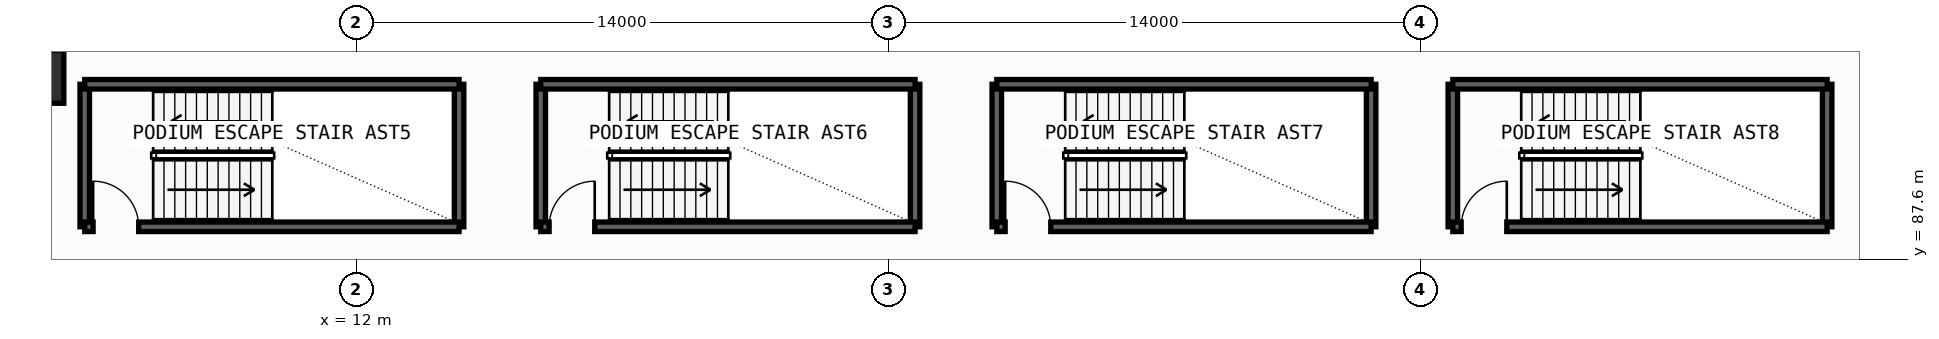
"""IFC4 building model, lengths in metres.
Left out: names, types, materials, properties, quantities, classifications, styles, units other than length and angle.
Written with IfcOpenShell. Run it as: python <this file> out.ifc"""

import sys

from ifc_helpers import new_model, si_unit, direction, frame, frame_2d, origin, origin_2d, place, context, subcontext, project, spatial, rectangle, extrude, element, fill, save


model = new_model("IFC4")
c1 = context("Model", 3, precision=1e-05, world=origin(), true_north=direction((0.0, 1.0)))
c2 = subcontext(c1, "Body", "Model", "MODEL_VIEW")
j1 = project(units=[si_unit("LENGTHUNIT", "METRE"), si_unit("PLANEANGLEUNIT", "RADIAN")], contexts=[c1])
p1 = place(None, origin())
s1 = spatial("IfcSite", under=j1, at=p1, CompositionType="ELEMENT")
p2 = place(p1, origin())
s2 = spatial("IfcBuilding", under=s1, at=p2, CompositionType="ELEMENT")
p3 = place(p2, frame((0.0, 0.0, 13.2)))
s3 = spatial("IfcBuildingStorey", under=s2, at=p3, CompositionType="ELEMENT", Elevation=13.2)
p4 = place(p3, frame((3.6, 92.4, 0.0), z_axis=(0.0, 0.0, 1.0), x_axis=(1.0, 0.0, 0.0)))
e1 = element("IfcColumn", 1, at=p4, inside=s3, PredefinedType="COLUMN", context=c2, shape_type="SweptSolid", body=[
    extrude(rectangle(XDim=1.4, YDim=1.4, at=origin_2d()), origin(), (0.0, 0.0, 1.0), 4.2),
])
for number, where, z_axis, x_axis in (
    (2, (4.85, 88.45, -0.32), (0.0, 0.0, 1.0), (0.0, 1.0, 0.0)),
    (3, (14.7, 88.45, -0.32), (0.0, 0.0, 1.0), (0.0, 1.0, 0.0)),
):
    element("IfcWall", number, at=place(p3, frame(where, z_axis=z_axis, x_axis=x_axis)), inside=s3, PredefinedType="SOLIDWALL", context=c2, shape_type="SweptSolid", body=[
        extrude(rectangle(XDim=3.75, YDim=0.25, at=frame_2d((1.875, 0.0))), origin(), (0.0, 0.0, 1.0), 4.2),
    ])
p5 = place(p3, frame((4.85, 92.2, -0.32), z_axis=(0.0, 0.0, 1.0), x_axis=(1.0, 0.0, 0.0)))
e4 = element("IfcWall", 4, at=p5, inside=s3, PredefinedType="SOLIDWALL", context=c2, shape_type="SweptSolid", body=[
    extrude(rectangle(XDim=9.85, YDim=0.25, at=frame_2d((4.925, 0.0))), origin(), (0.0, 0.0, 1.0), 4.2),
])
p6 = place(p3, frame((4.85, 88.45, -0.32), z_axis=(0.0, 0.0, 1.0), x_axis=(1.0, 0.0, 0.0)))
e5 = element("IfcWall", 5, at=p6, inside=s3, PredefinedType="SOLIDWALL", context=c2, shape_type="SweptSolid", body=[
    extrude(rectangle(XDim=9.85, YDim=0.25, at=frame_2d((4.925, 0.0))), origin(), (0.0, 0.0, 1.0), 4.2),
])
p7 = place(p6, frame((0.22, 0.0, 0.32)))
e6 = element("IfcOpeningElement", 6, at=p7, cuts=e5, PredefinedType="OPENING", context=c2, shape_type="SweptSolid", body=[
    extrude(rectangle(XDim=1.2, YDim=2.2, at=frame_2d((0.6, 1.1))), frame((0.0, 0.135, 0.0), z_axis=(0.0, -1.0, 0.0), x_axis=(1.0, 0.0, 0.0)), (0.0, 0.0, 1.0), 0.27),
])
for number, where, z_axis, x_axis in (
    (7, (16.85, 88.45, -0.32), (0.0, 0.0, 1.0), (0.0, 1.0, 0.0)),
    (8, (26.7, 88.45, -0.32), (0.0, 0.0, 1.0), (0.0, 1.0, 0.0)),
):
    element("IfcWall", number, at=place(p3, frame(where, z_axis=z_axis, x_axis=x_axis)), inside=s3, PredefinedType="SOLIDWALL", context=c2, shape_type="SweptSolid", body=[
        extrude(rectangle(XDim=3.75, YDim=0.25, at=frame_2d((1.875, 0.0))), origin(), (0.0, 0.0, 1.0), 4.2),
    ])
p8 = place(p3, frame((16.85, 92.2, -0.32), z_axis=(0.0, 0.0, 1.0), x_axis=(1.0, 0.0, 0.0)))
e9 = element("IfcWall", 9, at=p8, inside=s3, PredefinedType="SOLIDWALL", context=c2, shape_type="SweptSolid", body=[
    extrude(rectangle(XDim=9.85, YDim=0.25, at=frame_2d((4.925, 0.0))), origin(), (0.0, 0.0, 1.0), 4.2),
])
p9 = place(p3, frame((16.85, 88.45, -0.32), z_axis=(0.0, 0.0, 1.0), x_axis=(1.0, 0.0, 0.0)))
e10 = element("IfcWall", 10, at=p9, inside=s3, PredefinedType="SOLIDWALL", context=c2, shape_type="SweptSolid", body=[
    extrude(rectangle(XDim=9.85, YDim=0.25, at=frame_2d((4.925, 0.0))), origin(), (0.0, 0.0, 1.0), 4.2),
])
p10 = place(p9, frame((0.22, 0.0, 0.32)))
e11 = element("IfcOpeningElement", 11, at=p10, cuts=e10, PredefinedType="OPENING", context=c2, shape_type="SweptSolid", body=[
    extrude(rectangle(XDim=1.2, YDim=2.2, at=frame_2d((0.6, 1.1))), frame((0.0, 0.135, 0.0), z_axis=(0.0, -1.0, 0.0), x_axis=(1.0, 0.0, 0.0)), (0.0, 0.0, 1.0), 0.27),
])
for number, where, z_axis, x_axis in (
    (12, (28.85, 88.45, -0.32), (0.0, 0.0, 1.0), (0.0, 1.0, 0.0)),
    (13, (38.7, 88.45, -0.32), (0.0, 0.0, 1.0), (0.0, 1.0, 0.0)),
):
    element("IfcWall", number, at=place(p3, frame(where, z_axis=z_axis, x_axis=x_axis)), inside=s3, PredefinedType="SOLIDWALL", context=c2, shape_type="SweptSolid", body=[
        extrude(rectangle(XDim=3.75, YDim=0.25, at=frame_2d((1.875, 0.0))), origin(), (0.0, 0.0, 1.0), 4.2),
    ])
p11 = place(p3, frame((28.85, 92.2, -0.32), z_axis=(0.0, 0.0, 1.0), x_axis=(1.0, 0.0, 0.0)))
e14 = element("IfcWall", 14, at=p11, inside=s3, PredefinedType="SOLIDWALL", context=c2, shape_type="SweptSolid", body=[
    extrude(rectangle(XDim=9.85, YDim=0.25, at=frame_2d((4.925, 0.0))), origin(), (0.0, 0.0, 1.0), 4.2),
])
p12 = place(p3, frame((28.85, 88.45, -0.32), z_axis=(0.0, 0.0, 1.0), x_axis=(1.0, 0.0, 0.0)))
e15 = element("IfcWall", 15, at=p12, inside=s3, PredefinedType="SOLIDWALL", context=c2, shape_type="SweptSolid", body=[
    extrude(rectangle(XDim=9.85, YDim=0.25, at=frame_2d((4.925, 0.0))), origin(), (0.0, 0.0, 1.0), 4.2),
])
p13 = place(p12, frame((0.22, 0.0, 0.32)))
e16 = element("IfcOpeningElement", 16, at=p13, cuts=e15, PredefinedType="OPENING", context=c2, shape_type="SweptSolid", body=[
    extrude(rectangle(XDim=1.2, YDim=2.2, at=frame_2d((0.6, 1.1))), frame((0.0, 0.135, 0.0), z_axis=(0.0, -1.0, 0.0), x_axis=(1.0, 0.0, 0.0)), (0.0, 0.0, 1.0), 0.27),
])
for number, where, z_axis, x_axis in (
    (17, (40.85, 88.45, -0.32), (0.0, 0.0, 1.0), (0.0, 1.0, 0.0)),
    (18, (50.7, 88.45, -0.32), (0.0, 0.0, 1.0), (0.0, 1.0, 0.0)),
):
    element("IfcWall", number, at=place(p3, frame(where, z_axis=z_axis, x_axis=x_axis)), inside=s3, PredefinedType="SOLIDWALL", context=c2, shape_type="SweptSolid", body=[
        extrude(rectangle(XDim=3.75, YDim=0.25, at=frame_2d((1.875, 0.0))), origin(), (0.0, 0.0, 1.0), 4.2),
    ])
p14 = place(p3, frame((40.85, 92.2, -0.32), z_axis=(0.0, 0.0, 1.0), x_axis=(1.0, 0.0, 0.0)))
e19 = element("IfcWall", 19, at=p14, inside=s3, PredefinedType="SOLIDWALL", context=c2, shape_type="SweptSolid", body=[
    extrude(rectangle(XDim=9.85, YDim=0.25, at=frame_2d((4.925, 0.0))), origin(), (0.0, 0.0, 1.0), 4.2),
])
p15 = place(p3, frame((40.85, 88.45, -0.32), z_axis=(0.0, 0.0, 1.0), x_axis=(1.0, 0.0, 0.0)))
e20 = element("IfcWall", 20, at=p15, inside=s3, PredefinedType="SOLIDWALL", context=c2, shape_type="SweptSolid", body=[
    extrude(rectangle(XDim=9.85, YDim=0.25, at=frame_2d((4.925, 0.0))), origin(), (0.0, 0.0, 1.0), 4.2),
])
p16 = place(p15, frame((0.22, 0.0, 0.32)))
e21 = element("IfcOpeningElement", 21, at=p16, cuts=e20, PredefinedType="OPENING", context=c2, shape_type="SweptSolid", body=[
    extrude(rectangle(XDim=1.2, YDim=2.2, at=frame_2d((0.6, 1.1))), frame((0.0, 0.135, 0.0), z_axis=(0.0, -1.0, 0.0), x_axis=(1.0, 0.0, 0.0)), (0.0, 0.0, 1.0), 0.27),
])
p17 = place(p7, origin())
e22 = element("IfcDoor", 22, at=p17, inside=s3, OperationType="SINGLE_SWING_LEFT", PredefinedType="USERDEFINED", context=c2, shape_type="SweptSolid", body=[
    extrude(rectangle(XDim=1.2, YDim=2.2, at=frame_2d((0.6, 1.1))), frame((0.0, 0.025, 0.0), z_axis=(0.0, -1.0, 0.0), x_axis=(1.0, 0.0, 0.0)), (0.0, 0.0, 1.0), 0.05),
])
fill(e6, e22)
p18 = place(p10, origin())
e23 = element("IfcDoor", 23, at=p18, inside=s3, OperationType="SINGLE_SWING_RIGHT", PredefinedType="USERDEFINED", context=c2, shape_type="SweptSolid", body=[
    extrude(rectangle(XDim=1.2, YDim=2.2, at=frame_2d((0.6, 1.1))), frame((0.0, 0.025, 0.0), z_axis=(0.0, -1.0, 0.0), x_axis=(1.0, 0.0, 0.0)), (0.0, 0.0, 1.0), 0.05),
])
fill(e11, e23)
p19 = place(p13, origin())
e24 = element("IfcDoor", 24, at=p19, inside=s3, OperationType="SINGLE_SWING_LEFT", PredefinedType="USERDEFINED", context=c2, shape_type="SweptSolid", body=[
    extrude(rectangle(XDim=1.2, YDim=2.2, at=frame_2d((0.6, 1.1))), frame((0.0, 0.025, 0.0), z_axis=(0.0, -1.0, 0.0), x_axis=(1.0, 0.0, 0.0)), (0.0, 0.0, 1.0), 0.05),
])
fill(e16, e24)
p20 = place(p16, origin())
e25 = element("IfcDoor", 25, at=p20, inside=s3, OperationType="SINGLE_SWING_RIGHT", PredefinedType="USERDEFINED", context=c2, shape_type="SweptSolid", body=[
    extrude(rectangle(XDim=1.2, YDim=2.2, at=frame_2d((0.6, 1.1))), frame((0.0, 0.025, 0.0), z_axis=(0.0, -1.0, 0.0), x_axis=(1.0, 0.0, 0.0)), (0.0, 0.0, 1.0), 0.05),
])
fill(e21, e25)
save(model, sys.argv[1])
